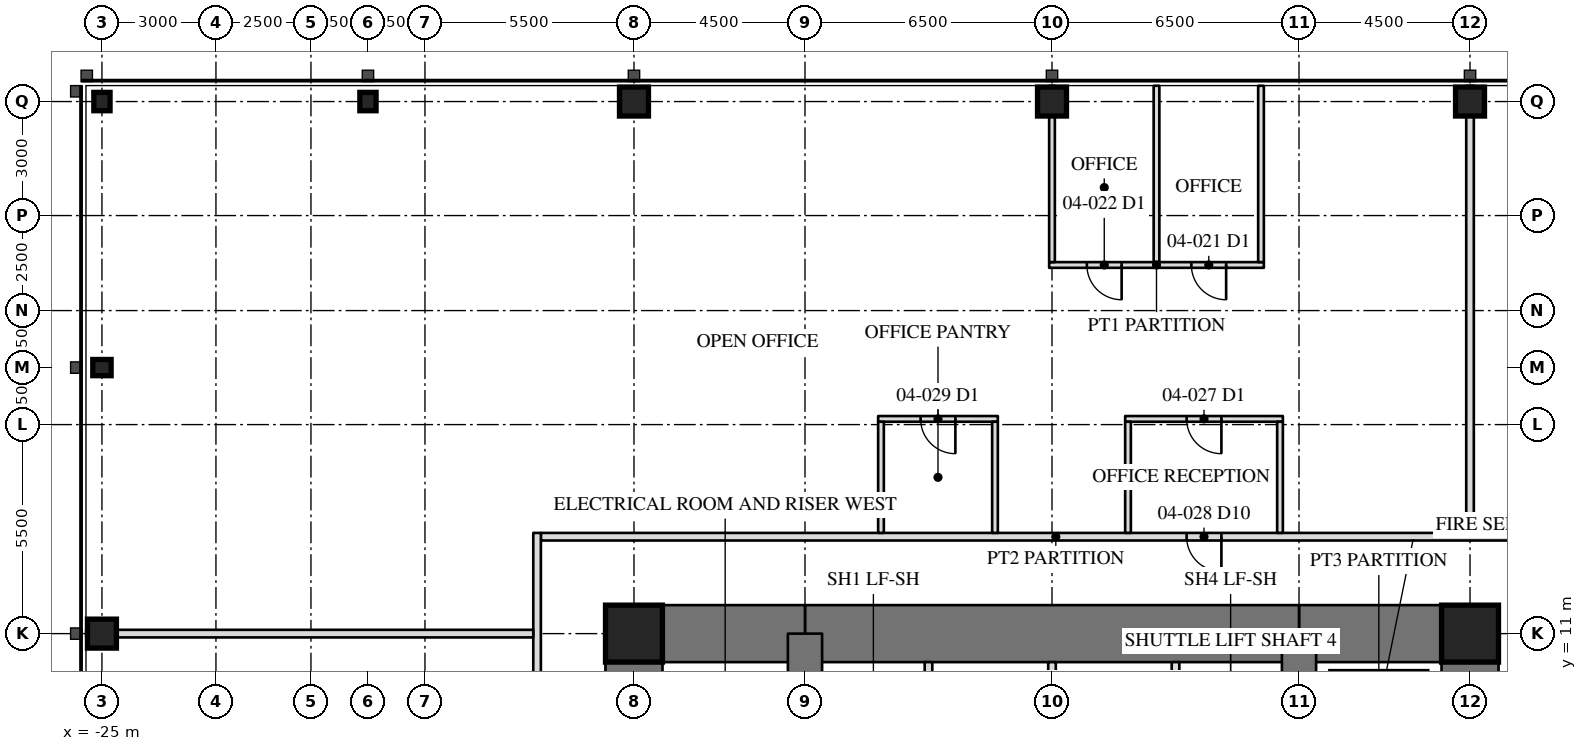
"""IFC4 building model, lengths in metres.
Left out: names, types, materials, properties, quantities, classifications, styles, units other than length and angle.
Written with IfcOpenShell. Run it as: python <this file> out.ifc"""

import sys

from ifc_helpers import new_model, si_unit, direction, frame, frame_2d, origin, origin_2d, place, context, subcontext, project, spatial, rectangle, hollow_rectangle, i_section, extrude, element, fill, save


model = new_model("IFC4")
c1 = context("Model", 3, precision=1e-05, world=origin(), true_north=direction((0.0, 1.0)))
c2 = subcontext(c1, "Body", "Model", "MODEL_VIEW")
j1 = project(units=[si_unit("LENGTHUNIT", "METRE"), si_unit("PLANEANGLEUNIT", "RADIAN")], contexts=[c1])
p1 = place(None, origin())
s1 = spatial("IfcSite", under=j1, at=p1, CompositionType="ELEMENT")
p2 = place(p1, origin())
s2 = spatial("IfcBuilding", under=s1, at=p2, CompositionType="ELEMENT")
p3 = place(p2, frame((0.0, 0.0, 20.1)))
s3 = spatial("IfcBuildingStorey", under=s2, at=p3, CompositionType="ELEMENT", Elevation=20.1)
for number, where, z_axis, x_axis in (
    (1, (11.0, 25.0, 0.0), (0.0, 0.0, 1.0), (1.0, 0.0, 0.0)),
    (2, (0.0, 25.0, 0.0), (0.0, 0.0, 1.0), (1.0, 0.0, 0.0)),
    (3, (-11.0, 25.0, 0.0), (0.0, 0.0, 1.0), (1.0, 0.0, 0.0)),
):
    element("IfcColumn", number, at=place(p3, frame(where, z_axis=z_axis, x_axis=x_axis)), inside=s3, PredefinedType="COLUMN", context=c2, shape_type="SweptSolid", body=[
        extrude(hollow_rectangle(XDim=0.762, YDim=0.762, WallThickness=0.152, at=origin_2d()), origin(), (0.0, 0.0, 1.0), 4.1),
    ])
for number, where, z_axis, x_axis in (
    (4, (-18.0, 25.0, 0.0), (0.0, 0.0, 1.0), (1.0, 0.0, 0.0)),
    (5, (-25.0, 25.0, 0.0), (0.0, 0.0, 1.0), (1.0, 0.0, 0.0)),
    (6, (-25.0, 18.0, 0.0), (0.0, 0.0, 1.0), (0.0, 1.0, 0.0)),
):
    element("IfcColumn", number, at=place(p3, frame(where, z_axis=z_axis, x_axis=x_axis)), inside=s3, PredefinedType="COLUMN", context=c2, shape_type="SweptSolid", body=[
        extrude(i_section(OverallWidth=0.427, OverallDepth=0.483, WebThickness=0.051, FlangeThickness=0.082, at=origin_2d()), origin(), (0.0, 0.0, 1.0), 4.1),
    ])
p4 = place(p3, frame((-25.0, 11.0, 0.0), z_axis=(0.0, 0.0, 1.0), x_axis=(0.0, 1.0, 0.0)))
e7 = element("IfcColumn", 7, at=p4, inside=s3, PredefinedType="COLUMN", context=c2, shape_type="SweptSolid", body=[
    extrude(hollow_rectangle(XDim=0.762, YDim=0.762, WallThickness=0.152, at=origin_2d()), origin(), (0.0, 0.0, 1.0), 4.1),
])
p5 = place(p3, frame((11.0, -11.0, 0.0), z_axis=(0.0, 0.0, 1.0), x_axis=(0.0, 1.0, 0.0)))
e8 = element("IfcWall", 8, at=p5, inside=s3, PredefinedType="SHEAR", context=c2, shape_type="SweptSolid", body=[
    extrude(rectangle(XDim=22.0, YDim=1.5, at=frame_2d((11.0, 0.0))), origin(), (0.0, 0.0, 1.0), 4.1),
])
p6 = place(p5, frame((15.393, 0.0, 0.0)))
e9 = element("IfcOpeningElement", 9, at=p6, cuts=e8, PredefinedType="OPENING", context=c2, shape_type="SweptSolid", body=[
    extrude(rectangle(XDim=0.915, YDim=2.134, at=frame_2d((0.458, 1.067))), frame((0.0, 0.76, 0.0), z_axis=(0.0, -1.0, 0.0), x_axis=(1.0, 0.0, 0.0)), (0.0, 0.0, 1.0), 1.52),
])
p7 = place(p3, frame((-11.0, 11.0, 0.0), z_axis=(0.0, 0.0, 1.0), x_axis=(0.0, -1.0, 0.0)))
e10 = element("IfcWall", 10, at=p7, inside=s3, PredefinedType="SHEAR", context=c2, shape_type="SweptSolid", body=[
    extrude(rectangle(XDim=22.0, YDim=1.5, at=frame_2d((11.0, 0.0))), origin(), (0.0, 0.0, 1.0), 4.1),
])
p8 = place(p7, frame((15.393, 0.0, 0.0)))
e11 = element("IfcOpeningElement", 11, at=p8, cuts=e10, PredefinedType="OPENING", context=c2, shape_type="SweptSolid", body=[
    extrude(rectangle(XDim=0.915, YDim=2.134, at=frame_2d((0.458, 1.067))), frame((0.0, 0.76, 0.0), z_axis=(0.0, -1.0, 0.0), x_axis=(1.0, 0.0, 0.0)), (0.0, 0.0, 1.0), 1.52),
])
p9 = place(p3, frame((11.0, 11.0, 0.0), z_axis=(0.0, 0.0, 1.0), x_axis=(-1.0, 0.0, 0.0)))
e12 = element("IfcWall", 12, at=p9, inside=s3, PredefinedType="SHEAR", context=c2, shape_type="SweptSolid", body=[
    extrude(rectangle(XDim=4.5, YDim=1.5, at=frame_2d((2.25, 0.0))), origin(), (0.0, 0.0, 1.0), 4.1),
])
p10 = place(p3, frame((6.5, 11.0, 0.0), z_axis=(0.0, 0.0, 1.0), x_axis=(-1.0, 0.0, 0.0)))
e13 = element("IfcWall", 13, at=p10, inside=s3, PredefinedType="SHEAR", context=c2, shape_type="SweptSolid", body=[
    extrude(rectangle(XDim=13.0, YDim=1.5, at=frame_2d((6.5, 0.0))), origin(), (0.0, 0.0, 1.0), 4.1),
])
p11 = place(p3, frame((-6.5, 11.0, 0.0), z_axis=(0.0, 0.0, 1.0), x_axis=(-1.0, 0.0, 0.0)))
e14 = element("IfcWall", 14, at=p11, inside=s3, PredefinedType="SHEAR", context=c2, shape_type="SweptSolid", body=[
    extrude(rectangle(XDim=4.5, YDim=1.5, at=frame_2d((2.25, 0.0))), origin(), (0.0, 0.0, 1.0), 4.1),
])
for number, where, z_axis, x_axis in (
    (15, (6.5, 6.5, 0.0), (0.0, 0.0, 1.0), (0.0, 1.0, 0.0)),
    (16, (-6.5, 11.0, 0.0), (0.0, 0.0, 1.0), (0.0, -1.0, 0.0)),
):
    element("IfcWall", number, at=place(p3, frame(where, z_axis=z_axis, x_axis=x_axis)), inside=s3, PredefinedType="SHEAR", context=c2, shape_type="SweptSolid", body=[
        extrude(rectangle(XDim=4.5, YDim=0.9, at=frame_2d((2.25, 0.0))), origin(), (0.0, 0.0, 1.0), 4.1),
    ])
for number, where, z_axis, x_axis in (
    (17, (11.0, 11.0, 0.0), (0.0, 0.0, 1.0), (1.0, 0.0, 0.0)),
    (18, (-11.0, 11.0, 0.0), (0.0, 0.0, 1.0), (1.0, 0.0, 0.0)),
):
    element("IfcColumn", number, at=place(p3, frame(where, z_axis=z_axis, x_axis=x_axis)), inside=s3, PredefinedType="COLUMN", context=c2, shape_type="SweptSolid", body=[
        extrude(hollow_rectangle(XDim=1.499, YDim=1.499, WallThickness=0.102, at=origin_2d()), origin(), (0.0, 0.0, 1.0), 4.1),
    ])
for number, where, z_axis, x_axis in (
    (19, (-3.25, 6.95, 0.0), (0.0, 0.0, 1.0), (0.0, 1.0, 0.0)),
    (20, (0.0, 6.95, 0.0), (0.0, 0.0, 1.0), (0.0, 1.0, 0.0)),
    (21, (3.25, 6.95, 0.0), (0.0, 0.0, 1.0), (0.0, 1.0, 0.0)),
):
    element("IfcWall", number, at=place(p3, frame(where, z_axis=z_axis, x_axis=x_axis)), inside=s3, PredefinedType="PARTITIONING", context=c2, shape_type="SweptSolid", body=[
        extrude(rectangle(XDim=3.3, YDim=0.2, at=frame_2d((1.65, 0.0))), origin(), (0.0, 0.0, 1.0), 3.91),
    ])
p12 = place(p3, frame((13.65, 13.55, 0.0), z_axis=(0.0, 0.0, 1.0), x_axis=(-1.0, 0.0, 0.0)))
e22 = element("IfcWall", 22, at=p12, inside=s3, PredefinedType="PARTITIONING", context=c2, shape_type="SweptSolid", body=[
    extrude(rectangle(XDim=27.1, YDim=0.2, at=frame_2d((13.55, 0.0))), origin(), (0.0, 0.0, 1.0), 3.91),
])
p13 = place(p12, frame((9.192, 0.0, 0.0)))
e23 = element("IfcOpeningElement", 23, at=p13, cuts=e22, PredefinedType="OPENING", context=c2, shape_type="SweptSolid", body=[
    extrude(rectangle(XDim=0.915, YDim=2.134, at=frame_2d((0.458, 1.067))), frame((0.0, 0.11, 0.0), z_axis=(0.0, -1.0, 0.0), x_axis=(1.0, 0.0, 0.0)), (0.0, 0.0, 1.0), 0.22),
])
p14 = place(p3, frame((-13.55, 13.65, 0.0), z_axis=(0.0, 0.0, 1.0), x_axis=(0.0, -1.0, 0.0)))
e24 = element("IfcWall", 24, at=p14, inside=s3, PredefinedType="PARTITIONING", context=c2, shape_type="SweptSolid", body=[
    extrude(rectangle(XDim=27.1, YDim=0.2, at=frame_2d((13.55, 0.0))), origin(), (0.0, 0.0, 1.0), 3.91),
])
p15 = place(p14, frame((6.192, 0.0, 0.0)))
e25 = element("IfcOpeningElement", 25, at=p15, cuts=e24, PredefinedType="OPENING", context=c2, shape_type="SweptSolid", body=[
    extrude(rectangle(XDim=0.915, YDim=2.134, at=frame_2d((0.458, 1.067))), frame((0.0, 0.11, 0.0), z_axis=(0.0, -1.0, 0.0), x_axis=(1.0, 0.0, 0.0)), (0.0, 0.0, 1.0), 0.22),
])
for number, where, z_axis, x_axis in (
    (26, (11.0, 13.65, 0.0), (0.0, 0.0, 1.0), (0.0, 1.0, 0.0)),
    (27, (-13.65, 11.0, 0.0), (0.0, 0.0, 1.0), (-1.0, 0.0, 0.0)),
):
    element("IfcWall", number, at=place(p3, frame(where, z_axis=z_axis, x_axis=x_axis)), inside=s3, PredefinedType="PARTITIONING", context=c2, shape_type="SweptSolid", body=[
        extrude(rectangle(XDim=11.765, YDim=0.2, at=frame_2d((5.883, 0.0))), origin(), (0.0, 0.0, 1.0), 3.13),
    ])
p16 = place(p3, frame((5.575, 20.7, 0.0), z_axis=(0.0, 0.0, 1.0), x_axis=(-1.0, 0.0, 0.0)))
e28 = element("IfcWall", 28, at=p16, inside=s3, PredefinedType="PARTITIONING", context=c2, shape_type="SweptSolid", body=[
    extrude(rectangle(XDim=5.65, YDim=0.15, at=frame_2d((2.825, 0.0))), origin(), (0.0, 0.0, 1.0), 3.91),
])
p17 = place(p16, frame((0.992, 0.0, 0.0)))
e29 = element("IfcOpeningElement", 29, at=p17, cuts=e28, PredefinedType="OPENING", context=c2, shape_type="SweptSolid", body=[
    extrude(rectangle(XDim=0.915, YDim=2.134, at=frame_2d((0.458, 1.067))), frame((0.0, 0.085, 0.0), z_axis=(0.0, -1.0, 0.0), x_axis=(1.0, 0.0, 0.0)), (0.0, 0.0, 1.0), 0.17),
])
p18 = place(p16, frame((3.742, 0.0, 0.0)))
e30 = element("IfcOpeningElement", 30, at=p18, cuts=e28, PredefinedType="OPENING", context=c2, shape_type="SweptSolid", body=[
    extrude(rectangle(XDim=0.915, YDim=2.134, at=frame_2d((0.458, 1.067))), frame((0.0, 0.085, 0.0), z_axis=(0.0, -1.0, 0.0), x_axis=(1.0, 0.0, 0.0)), (0.0, 0.0, 1.0), 0.17),
])
for number, where, z_axis, x_axis in (
    (31, (5.5, 20.775, 0.0), (0.0, 0.0, 1.0), (0.0, 1.0, 0.0)),
    (32, (2.75, 20.775, 0.0), (0.0, 0.0, 1.0), (0.0, 1.0, 0.0)),
):
    element("IfcWall", number, at=place(p3, frame(where, z_axis=z_axis, x_axis=x_axis)), inside=s3, PredefinedType="PARTITIONING", context=c2, shape_type="SweptSolid", body=[
        extrude(rectangle(XDim=4.64, YDim=0.15, at=frame_2d((2.32, 0.0))), origin(), (0.0, 0.0, 1.0), 3.91),
    ])
p19 = place(p3, frame((0.0, 20.775, 0.0), z_axis=(0.0, 0.0, 1.0), x_axis=(0.0, 1.0, 0.0)))
e33 = element("IfcWall", 33, at=p19, inside=s3, PredefinedType="PARTITIONING", context=c2, shape_type="SweptSolid", body=[
    extrude(rectangle(XDim=4.64, YDim=0.15, at=frame_2d((2.32, 0.0))), origin(), (0.0, 0.0, 1.0), 3.13),
])
p20 = place(p3, frame((6.075, 16.65, 0.0), z_axis=(0.0, 0.0, 1.0), x_axis=(-1.0, 0.0, 0.0)))
e34 = element("IfcWall", 34, at=p20, inside=s3, PredefinedType="PARTITIONING", context=c2, shape_type="SweptSolid", body=[
    extrude(rectangle(XDim=4.15, YDim=0.15, at=frame_2d((2.075, 0.0))), origin(), (0.0, 0.0, 1.0), 3.91),
])
p21 = place(p20, frame((1.617, 0.0, 0.0)))
e35 = element("IfcOpeningElement", 35, at=p21, cuts=e34, PredefinedType="OPENING", context=c2, shape_type="SweptSolid", body=[
    extrude(rectangle(XDim=0.915, YDim=2.134, at=frame_2d((0.458, 1.067))), frame((0.0, 0.085, 0.0), z_axis=(0.0, -1.0, 0.0), x_axis=(1.0, 0.0, 0.0)), (0.0, 0.0, 1.0), 0.17),
])
for number, where, z_axis, x_axis in (
    (36, (6.0, 16.575, 0.0), (0.0, 0.0, 1.0), (0.0, -1.0, 0.0)),
    (37, (2.0, 16.575, 0.0), (0.0, 0.0, 1.0), (0.0, -1.0, 0.0)),
):
    element("IfcWall", number, at=place(p3, frame(where, z_axis=z_axis, x_axis=x_axis)), inside=s3, PredefinedType="PARTITIONING", context=c2, shape_type="SweptSolid", body=[
        extrude(rectangle(XDim=2.925, YDim=0.15, at=frame_2d((1.462, 0.0))), origin(), (0.0, 0.0, 1.0), 3.91),
    ])
p22 = place(p3, frame((-1.425, 16.65, 0.0), z_axis=(0.0, 0.0, 1.0), x_axis=(-1.0, 0.0, 0.0)))
e38 = element("IfcWall", 38, at=p22, inside=s3, PredefinedType="PARTITIONING", context=c2, shape_type="SweptSolid", body=[
    extrude(rectangle(XDim=3.15, YDim=0.15, at=frame_2d((1.575, 0.0))), origin(), (0.0, 0.0, 1.0), 3.91),
])
p23 = place(p22, frame((1.117, 0.0, 0.0)))
e39 = element("IfcOpeningElement", 39, at=p23, cuts=e38, PredefinedType="OPENING", context=c2, shape_type="SweptSolid", body=[
    extrude(rectangle(XDim=0.915, YDim=2.134, at=frame_2d((0.458, 1.067))), frame((0.0, 0.085, 0.0), z_axis=(0.0, -1.0, 0.0), x_axis=(1.0, 0.0, 0.0)), (0.0, 0.0, 1.0), 0.17),
])
for number, where, z_axis, x_axis in (
    (40, (-1.5, 16.575, 0.0), (0.0, 0.0, 1.0), (0.0, -1.0, 0.0)),
    (41, (-4.5, 16.575, 0.0), (0.0, 0.0, 1.0), (0.0, -1.0, 0.0)),
):
    element("IfcWall", number, at=place(p3, frame(where, z_axis=z_axis, x_axis=x_axis)), inside=s3, PredefinedType="PARTITIONING", context=c2, shape_type="SweptSolid", body=[
        extrude(rectangle(XDim=2.925, YDim=0.15, at=frame_2d((1.462, 0.0))), origin(), (0.0, 0.0, 1.0), 3.91),
    ])
p24 = place(p17, origin())
e42 = element("IfcDoor", 42, at=p24, inside=s3, OperationType="SINGLE_SWING_LEFT", PredefinedType="DOOR", context=c2, shape_type="SweptSolid", body=[
    extrude(rectangle(XDim=0.915, YDim=2.134, at=frame_2d((0.458, 1.067))), frame((0.0, 0.025, 0.0), z_axis=(0.0, -1.0, 0.0), x_axis=(1.0, 0.0, 0.0)), (0.0, 0.0, 1.0), 0.05),
])
fill(e29, e42)
p25 = place(p18, origin())
e43 = element("IfcDoor", 43, at=p25, inside=s3, OperationType="SINGLE_SWING_LEFT", PredefinedType="DOOR", context=c2, shape_type="SweptSolid", body=[
    extrude(rectangle(XDim=0.915, YDim=2.134, at=frame_2d((0.458, 1.067))), frame((0.0, 0.025, 0.0), z_axis=(0.0, -1.0, 0.0), x_axis=(1.0, 0.0, 0.0)), (0.0, 0.0, 1.0), 0.05),
])
fill(e30, e43)
p26 = place(p21, origin())
e44 = element("IfcDoor", 44, at=p26, inside=s3, OperationType="SINGLE_SWING_LEFT", PredefinedType="DOOR", context=c2, shape_type="SweptSolid", body=[
    extrude(rectangle(XDim=0.915, YDim=2.134, at=frame_2d((0.458, 1.067))), frame((0.0, 0.025, 0.0), z_axis=(0.0, -1.0, 0.0), x_axis=(1.0, 0.0, 0.0)), (0.0, 0.0, 1.0), 0.05),
])
fill(e35, e44)
p27 = place(p13, origin())
e45 = element("IfcDoor", 45, at=p27, inside=s3, OperationType="SINGLE_SWING_LEFT", PredefinedType="DOOR", context=c2, shape_type="SweptSolid", body=[
    extrude(rectangle(XDim=0.915, YDim=2.134, at=frame_2d((0.458, 1.067))), frame((0.0, 0.025, 0.0), z_axis=(0.0, -1.0, 0.0), x_axis=(1.0, 0.0, 0.0)), (0.0, 0.0, 1.0), 0.05),
])
fill(e23, e45)
p28 = place(p23, origin())
e46 = element("IfcDoor", 46, at=p28, inside=s3, OperationType="SINGLE_SWING_LEFT", PredefinedType="DOOR", context=c2, shape_type="SweptSolid", body=[
    extrude(rectangle(XDim=0.915, YDim=2.134, at=frame_2d((0.458, 1.067))), frame((0.0, 0.025, 0.0), z_axis=(0.0, -1.0, 0.0), x_axis=(1.0, 0.0, 0.0)), (0.0, 0.0, 1.0), 0.05),
])
fill(e39, e46)
save(model, sys.argv[1])
